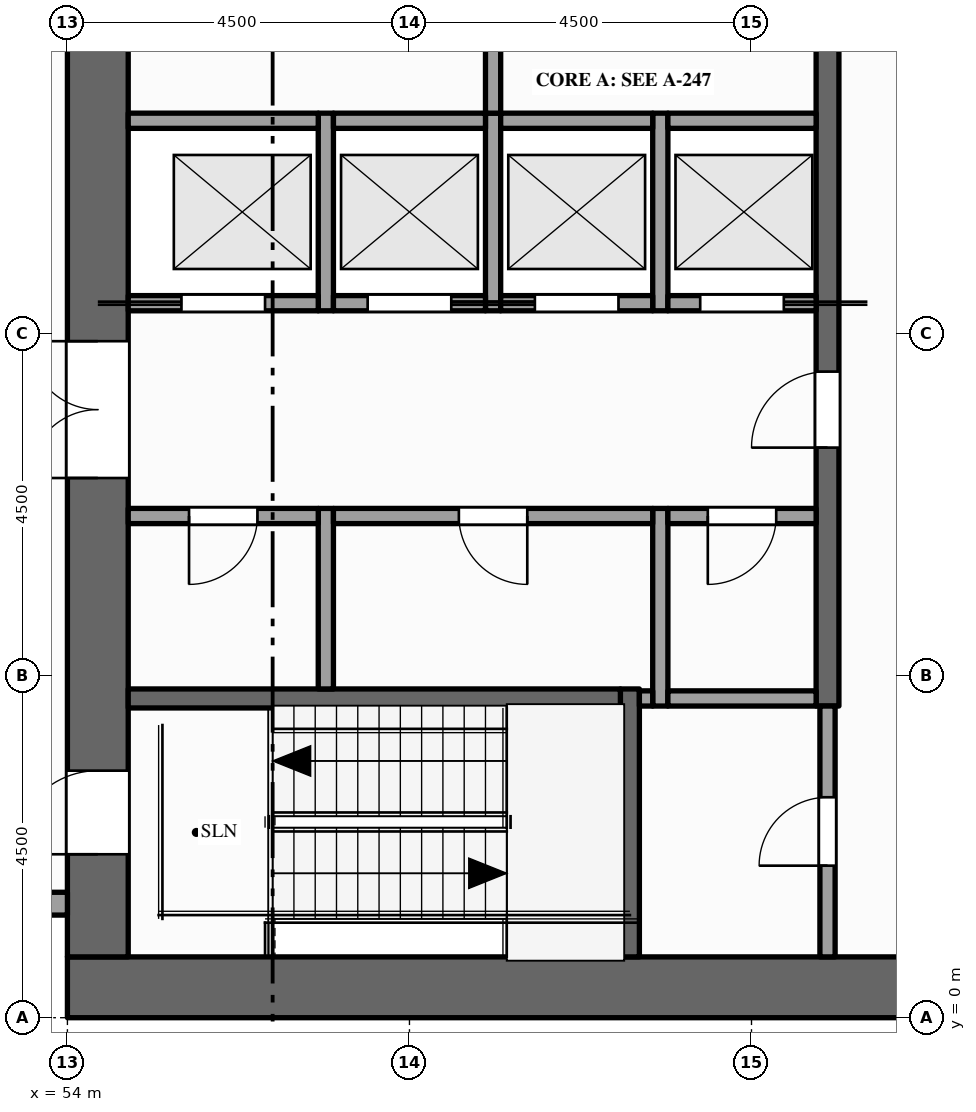
"""IFC4 building model, lengths in metres.
Left out: names, types, materials, properties, quantities, classifications, styles, units other than length and angle.
Written with IfcOpenShell. Run it as: python <this file> out.ifc"""

import sys

from ifc_helpers import new_model, si_unit, direction, frame, frame_2d, origin, place, context, subcontext, project, spatial, rectangle, extrude, element, fill, save


model = new_model("IFC4")
c1 = context("Model", 3, precision=1e-05, world=origin(), true_north=direction((0.0, 1.0)))
c2 = subcontext(c1, "Body", "Model", "MODEL_VIEW")
j1 = project(units=[si_unit("LENGTHUNIT", "METRE"), si_unit("PLANEANGLEUNIT", "RADIAN")], contexts=[c1])
p1 = place(None, origin())
s1 = spatial("IfcSite", under=j1, at=p1, CompositionType="ELEMENT")
p2 = place(p1, origin())
s2 = spatial("IfcBuilding", under=s1, at=p2, CompositionType="ELEMENT")
p3 = place(p2, frame((0.0, 0.0, 269.0)))
s3 = spatial("IfcBuildingStorey", under=s2, at=p3, CompositionType="ELEMENT", Elevation=269.0)
p4 = place(p3, frame((67.5, 0.4, -0.15), z_axis=(0.0, 0.0, 1.0), x_axis=(-1.0, 0.0, 0.0)))
e1 = element("IfcWall", 1, at=p4, inside=s3, PredefinedType="SHEAR", context=c2, shape_type="SweptSolid", body=[
    extrude(rectangle(XDim=13.5, YDim=0.8, at=frame_2d((6.75, 0.0))), origin(), (0.0, 0.0, 1.0), 4.0),
])
p5 = place(p3, frame((54.4, 0.8, -0.15), z_axis=(0.0, 0.0, 1.0), x_axis=(0.0, 1.0, 0.0)))
e2 = element("IfcWall", 2, at=p5, inside=s3, PredefinedType="SHEAR", context=c2, shape_type="SweptSolid", body=[
    extrude(rectangle(XDim=20.9, YDim=0.8, at=frame_2d((10.45, 0.0))), origin(), (0.0, 0.0, 1.0), 4.0),
])
p6 = place(p5, frame((6.3, 0.0, 0.15)))
e3 = element("IfcOpeningElement", 3, at=p6, cuts=e2, PredefinedType="OPENING", context=c2, shape_type="SweptSolid", body=[
    extrude(rectangle(XDim=1.8, YDim=2.1, at=frame_2d((0.9, 1.05))), frame((0.0, 0.41, 0.0), z_axis=(0.0, -1.0, 0.0), x_axis=(1.0, 0.0, 0.0)), (0.0, 0.0, 1.0), 0.82),
])
p7 = place(p5, frame((12.35, 0.0, 0.15)))
e4 = element("IfcOpeningElement", 4, at=p7, cuts=e2, PredefinedType="OPENING", context=c2, shape_type="SweptSolid", body=[
    extrude(rectangle(XDim=1.1, YDim=2.1, at=frame_2d((0.55, 1.05))), frame((0.0, 0.41, 0.0), z_axis=(0.0, -1.0, 0.0), x_axis=(1.0, 0.0, 0.0)), (0.0, 0.0, 1.0), 0.82),
])
p8 = place(p5, frame((1.35, 0.0, 0.15)))
e5 = element("IfcOpeningElement", 5, at=p8, cuts=e2, PredefinedType="OPENING", context=c2, shape_type="SweptSolid", body=[
    extrude(rectangle(XDim=1.1, YDim=2.1, at=frame_2d((0.55, 1.05))), frame((0.0, 0.41, 0.0), z_axis=(0.0, -1.0, 0.0), x_axis=(1.0, 0.0, 0.0)), (0.0, 0.0, 1.0), 0.82),
])
p9 = place(p5, frame((18.55, 0.0, 0.15)))
e6 = element("IfcOpeningElement", 6, at=p9, cuts=e2, PredefinedType="OPENING", context=c2, shape_type="SweptSolid", body=[
    extrude(rectangle(XDim=1.1, YDim=2.1, at=frame_2d((0.55, 1.05))), frame((0.0, 0.41, 0.0), z_axis=(0.0, -1.0, 0.0), x_axis=(1.0, 0.0, 0.0)), (0.0, 0.0, 1.0), 0.82),
])
p10 = place(p3, frame((49.825, 1.5, 0.0), z_axis=(0.0, 0.0, 1.0), x_axis=(1.0, 0.0, 0.0)))
e7 = element("IfcWall", 7, at=p10, inside=s3, PredefinedType="STANDARD", context=c2, shape_type="SweptSolid", body=[
    extrude(rectangle(XDim=4.175, YDim=0.3, at=frame_2d((2.087, 0.0))), origin(), (0.0, 0.0, 1.0), 2.87),
])
p11 = place(p10, frame((0.413, 0.0, 0.9)))
e8 = element("IfcOpeningElement", 8, at=p11, cuts=e7, PredefinedType="OPENING", context=c2, shape_type="SweptSolid", body=[
    extrude(rectangle(XDim=1.2, YDim=1.75, at=frame_2d((0.6, 0.875))), frame((0.0, 0.16, 0.0), z_axis=(0.0, -1.0, 0.0), x_axis=(1.0, 0.0, 0.0)), (0.0, 0.0, 1.0), 0.32),
])
p12 = place(p10, frame((2.225, 0.0, 0.9)))
e9 = element("IfcOpeningElement", 9, at=p12, cuts=e7, PredefinedType="OPENING", context=c2, shape_type="SweptSolid", body=[
    extrude(rectangle(XDim=1.55, YDim=1.75, at=frame_2d((0.775, 0.875))), frame((0.0, 0.16, 0.0), z_axis=(0.0, -1.0, 0.0), x_axis=(1.0, 0.0, 0.0)), (0.0, 0.0, 1.0), 0.32),
])
p13 = place(p3, frame((57.4, 4.325, 0.0), z_axis=(0.0, 0.0, 1.0), x_axis=(0.0, 1.0, 0.0)))
e10 = element("IfcWall", 10, at=p13, inside=s3, PredefinedType="PARTITIONING", context=c2, shape_type="SweptSolid", body=[
    extrude(rectangle(XDim=2.375, YDim=0.2, at=frame_2d((1.188, 0.0))), origin(), (0.0, 0.0, 1.0), 3.85),
])
for number, where, z_axis, x_axis in (
    (11, (57.4, 9.3, 0.0), (0.0, 0.0, 1.0), (0.0, 1.0, 0.0)),
    (12, (59.6, 9.3, 0.0), (0.0, 0.0, 1.0), (0.0, 1.0, 0.0)),
):
    element("IfcWall", number, at=place(p3, frame(where, z_axis=z_axis, x_axis=x_axis)), inside=s3, PredefinedType="SOLIDWALL", context=c2, shape_type="SweptSolid", body=[
        extrude(rectangle(XDim=2.6, YDim=0.2, at=frame_2d((1.3, 0.0))), origin(), (0.0, 0.0, 1.0), 3.85),
    ])
p14 = place(p3, frame((59.6, 11.9, 0.0), z_axis=(0.0, 0.0, 1.0), x_axis=(0.0, 1.0, 0.0)))
e13 = element("IfcWall", 13, at=p14, inside=s3, PredefinedType="PARTITIONING", context=c2, shape_type="SweptSolid", body=[
    extrude(rectangle(XDim=3.6, YDim=0.2, at=frame_2d((1.8, 0.0))), origin(), (0.0, 0.0, 1.0), 3.85),
])
p15 = place(p14, frame((1.3, 0.0, 0.0)))
e14 = element("IfcOpeningElement", 14, at=p15, cuts=e13, PredefinedType="OPENING", context=c2, shape_type="SweptSolid", body=[
    extrude(rectangle(XDim=1.0, YDim=2.1, at=frame_2d((0.5, 1.05))), frame((0.0, 0.11, 0.0), z_axis=(0.0, -1.0, 0.0), x_axis=(1.0, 0.0, 0.0)), (0.0, 0.0, 1.0), 0.22),
])
p16 = place(p3, frame((61.4, 0.8, 0.0), z_axis=(0.0, 0.0, 1.0), x_axis=(0.0, 1.0, 0.0)))
e15 = element("IfcWall", 15, at=p16, inside=s3, PredefinedType="SHEAR", context=c2, shape_type="SweptSolid", body=[
    extrude(rectangle(XDim=3.525, YDim=0.25, at=frame_2d((1.762, 0.0))), origin(), (0.0, 0.0, 1.0), 3.85),
])
p17 = place(p3, frame((61.8, 4.1, 0.0), z_axis=(0.0, 0.0, 1.0), x_axis=(0.0, 1.0, 0.0)))
e16 = element("IfcWall", 16, at=p17, inside=s3, PredefinedType="PARTITIONING", context=c2, shape_type="SweptSolid", body=[
    extrude(rectangle(XDim=2.6, YDim=0.2, at=frame_2d((1.3, 0.0))), origin(), (0.0, 0.0, 1.0), 3.85),
])
p18 = place(p3, frame((61.8, 9.3, 0.0), z_axis=(0.0, 0.0, 1.0), x_axis=(0.0, 1.0, 0.0)))
e17 = element("IfcWall", 17, at=p18, inside=s3, PredefinedType="SOLIDWALL", context=c2, shape_type="SweptSolid", body=[
    extrude(rectangle(XDim=2.6, YDim=0.2, at=frame_2d((1.3, 0.0))), origin(), (0.0, 0.0, 1.0), 3.85),
])
p19 = place(p3, frame((64.0, 0.8, 0.0), z_axis=(0.0, 0.0, 1.0), x_axis=(0.0, 1.0, 0.0)))
e18 = element("IfcWall", 18, at=p19, inside=s3, PredefinedType="PARTITIONING", context=c2, shape_type="SweptSolid", body=[
    extrude(rectangle(XDim=3.3, YDim=0.2, at=frame_2d((1.65, 0.0))), origin(), (0.0, 0.0, 1.0), 3.85),
])
p20 = place(p19, frame((1.2, 0.0, 0.0)))
e19 = element("IfcOpeningElement", 19, at=p20, cuts=e18, PredefinedType="OPENING", context=c2, shape_type="SweptSolid", body=[
    extrude(rectangle(XDim=0.9, YDim=2.1, at=frame_2d((0.45, 1.05))), frame((0.0, 0.11, 0.0), z_axis=(0.0, -1.0, 0.0), x_axis=(1.0, 0.0, 0.0)), (0.0, 0.0, 1.0), 0.22),
])
p21 = place(p3, frame((64.0, 4.1, 0.0), z_axis=(0.0, 0.0, 1.0), x_axis=(0.0, 1.0, 0.0)))
e20 = element("IfcWall", 20, at=p21, inside=s3, PredefinedType="SHEAR", context=c2, shape_type="SweptSolid", body=[
    extrude(rectangle(XDim=14.5, YDim=0.3, at=frame_2d((7.25, 0.0))), origin(), (0.0, 0.0, 1.0), 3.85),
])
p22 = place(p21, frame((3.4, 0.0, 0.0)))
e21 = element("IfcOpeningElement", 21, at=p22, cuts=e20, PredefinedType="OPENING", context=c2, shape_type="SweptSolid", body=[
    extrude(rectangle(XDim=1.0, YDim=2.1, at=frame_2d((0.5, 1.05))), frame((0.0, 0.16, 0.0), z_axis=(0.0, -1.0, 0.0), x_axis=(1.0, 0.0, 0.0)), (0.0, 0.0, 1.0), 0.32),
])
p23 = place(p21, frame((9.1, 0.0, 0.0)))
e22 = element("IfcOpeningElement", 22, at=p23, cuts=e20, PredefinedType="OPENING", context=c2, shape_type="SweptSolid", body=[
    extrude(rectangle(XDim=1.0, YDim=2.1, at=frame_2d((0.5, 1.05))), frame((0.0, 0.16, 0.0), z_axis=(0.0, -1.0, 0.0), x_axis=(1.0, 0.0, 0.0)), (0.0, 0.0, 1.0), 0.32),
])
p24 = place(p3, frame((54.8, 4.2, 0.0), z_axis=(0.0, 0.0, 1.0), x_axis=(1.0, 0.0, 0.0)))
e23 = element("IfcWall", 23, at=p24, inside=s3, PredefinedType="SHEAR", context=c2, shape_type="SweptSolid", body=[
    extrude(rectangle(XDim=6.475, YDim=0.25, at=frame_2d((3.237, 0.0))), origin(), (0.0, 0.0, 1.0), 3.85),
])
p25 = place(p3, frame((61.525, 4.2, 0.0), z_axis=(0.0, 0.0, 1.0), x_axis=(1.0, 0.0, 0.0)))
e24 = element("IfcWall", 24, at=p25, inside=s3, PredefinedType="PARTITIONING", context=c2, shape_type="SweptSolid", body=[
    extrude(rectangle(XDim=0.175, YDim=0.2, at=frame_2d((0.087, 0.0))), origin(), (0.0, 0.0, 1.0), 3.85),
])
p26 = place(p3, frame((61.9, 4.2, 0.0), z_axis=(0.0, 0.0, 1.0), x_axis=(1.0, 0.0, 0.0)))
e25 = element("IfcWall", 25, at=p26, inside=s3, PredefinedType="PARTITIONING", context=c2, shape_type="SweptSolid", body=[
    extrude(rectangle(XDim=1.95, YDim=0.2, at=frame_2d((0.975, 0.0))), origin(), (0.0, 0.0, 1.0), 3.85),
])
p27 = place(p3, frame((54.8, 6.6, 0.0), z_axis=(0.0, 0.0, 1.0), x_axis=(1.0, 0.0, 0.0)))
e26 = element("IfcWall", 26, at=p27, inside=s3, PredefinedType="PARTITIONING", context=c2, shape_type="SweptSolid", body=[
    extrude(rectangle(XDim=2.5, YDim=0.2, at=frame_2d((1.25, 0.0))), origin(), (0.0, 0.0, 1.0), 3.85),
])
p28 = place(p27, frame((0.8, 0.0, 0.0)))
e27 = element("IfcOpeningElement", 27, at=p28, cuts=e26, PredefinedType="OPENING", context=c2, shape_type="SweptSolid", body=[
    extrude(rectangle(XDim=0.9, YDim=2.1, at=frame_2d((0.45, 1.05))), frame((0.0, 0.11, 0.0), z_axis=(0.0, -1.0, 0.0), x_axis=(1.0, 0.0, 0.0)), (0.0, 0.0, 1.0), 0.22),
])
p29 = place(p3, frame((57.5, 6.6, 0.0), z_axis=(0.0, 0.0, 1.0), x_axis=(1.0, 0.0, 0.0)))
e28 = element("IfcWall", 28, at=p29, inside=s3, PredefinedType="PARTITIONING", context=c2, shape_type="SweptSolid", body=[
    extrude(rectangle(XDim=4.2, YDim=0.2, at=frame_2d((2.1, 0.0))), origin(), (0.0, 0.0, 1.0), 3.85),
])
p30 = place(p29, frame((1.65, 0.0, 0.0)))
e29 = element("IfcOpeningElement", 29, at=p30, cuts=e28, PredefinedType="OPENING", context=c2, shape_type="SweptSolid", body=[
    extrude(rectangle(XDim=0.9, YDim=2.1, at=frame_2d((0.45, 1.05))), frame((0.0, 0.11, 0.0), z_axis=(0.0, -1.0, 0.0), x_axis=(1.0, 0.0, 0.0)), (0.0, 0.0, 1.0), 0.22),
])
p31 = place(p3, frame((61.9, 6.6, 0.0), z_axis=(0.0, 0.0, 1.0), x_axis=(1.0, 0.0, 0.0)))
e30 = element("IfcWall", 30, at=p31, inside=s3, PredefinedType="PARTITIONING", context=c2, shape_type="SweptSolid", body=[
    extrude(rectangle(XDim=1.95, YDim=0.2, at=frame_2d((0.975, 0.0))), origin(), (0.0, 0.0, 1.0), 3.85),
])
p32 = place(p31, frame((0.525, 0.0, 0.0)))
e31 = element("IfcOpeningElement", 31, at=p32, cuts=e30, PredefinedType="OPENING", context=c2, shape_type="SweptSolid", body=[
    extrude(rectangle(XDim=0.9, YDim=2.1, at=frame_2d((0.45, 1.05))), frame((0.0, 0.11, 0.0), z_axis=(0.0, -1.0, 0.0), x_axis=(1.0, 0.0, 0.0)), (0.0, 0.0, 1.0), 0.22),
])
p33 = place(p3, frame((54.8, 9.4, 0.0), z_axis=(0.0, 0.0, 1.0), x_axis=(1.0, 0.0, 0.0)))
e32 = element("IfcWall", 32, at=p33, inside=s3, PredefinedType="SOLIDWALL", context=c2, shape_type="SweptSolid", body=[
    extrude(rectangle(XDim=2.5, YDim=0.2, at=frame_2d((1.25, 0.0))), origin(), (0.0, 0.0, 1.0), 3.85),
])
p34 = place(p33, frame((0.7, 0.0, 0.012)))
e33 = element("IfcOpeningElement", 33, at=p34, cuts=e32, PredefinedType="OPENING", context=c2, shape_type="SweptSolid", body=[
    extrude(rectangle(XDim=1.1, YDim=2.1, at=frame_2d((0.55, 1.05))), frame((0.0, 0.11, 0.0), z_axis=(0.0, -1.0, 0.0), x_axis=(1.0, 0.0, 0.0)), (0.0, 0.0, 1.0), 0.22),
])
p35 = place(p3, frame((57.5, 9.4, 0.0), z_axis=(0.0, 0.0, 1.0), x_axis=(1.0, 0.0, 0.0)))
e34 = element("IfcWall", 34, at=p35, inside=s3, PredefinedType="SOLIDWALL", context=c2, shape_type="SweptSolid", body=[
    extrude(rectangle(XDim=2.0, YDim=0.2, at=frame_2d((1.0, 0.0))), origin(), (0.0, 0.0, 1.0), 3.85),
])
p36 = place(p35, frame((0.45, 0.0, 0.012)))
e35 = element("IfcOpeningElement", 35, at=p36, cuts=e34, PredefinedType="OPENING", context=c2, shape_type="SweptSolid", body=[
    extrude(rectangle(XDim=1.1, YDim=2.1, at=frame_2d((0.55, 1.05))), frame((0.0, 0.11, 0.0), z_axis=(0.0, -1.0, 0.0), x_axis=(1.0, 0.0, 0.0)), (0.0, 0.0, 1.0), 0.22),
])
p37 = place(p3, frame((59.7, 9.4, 0.0), z_axis=(0.0, 0.0, 1.0), x_axis=(1.0, 0.0, 0.0)))
e36 = element("IfcWall", 36, at=p37, inside=s3, PredefinedType="SOLIDWALL", context=c2, shape_type="SweptSolid", body=[
    extrude(rectangle(XDim=2.0, YDim=0.2, at=frame_2d((1.0, 0.0))), origin(), (0.0, 0.0, 1.0), 3.85),
])
p38 = place(p37, frame((0.45, 0.0, 0.012)))
e37 = element("IfcOpeningElement", 37, at=p38, cuts=e36, PredefinedType="OPENING", context=c2, shape_type="SweptSolid", body=[
    extrude(rectangle(XDim=1.1, YDim=2.1, at=frame_2d((0.55, 1.05))), frame((0.0, 0.11, 0.0), z_axis=(0.0, -1.0, 0.0), x_axis=(1.0, 0.0, 0.0)), (0.0, 0.0, 1.0), 0.22),
])
p39 = place(p3, frame((61.9, 9.4, 0.0), z_axis=(0.0, 0.0, 1.0), x_axis=(1.0, 0.0, 0.0)))
e38 = element("IfcWall", 38, at=p39, inside=s3, PredefinedType="SOLIDWALL", context=c2, shape_type="SweptSolid", body=[
    extrude(rectangle(XDim=1.95, YDim=0.2, at=frame_2d((0.975, 0.0))), origin(), (0.0, 0.0, 1.0), 3.85),
])
p40 = place(p39, frame((0.425, 0.0, 0.012)))
e39 = element("IfcOpeningElement", 39, at=p40, cuts=e38, PredefinedType="OPENING", context=c2, shape_type="SweptSolid", body=[
    extrude(rectangle(XDim=1.1, YDim=2.1, at=frame_2d((0.55, 1.05))), frame((0.0, 0.11, 0.0), z_axis=(0.0, -1.0, 0.0), x_axis=(1.0, 0.0, 0.0)), (0.0, 0.0, 1.0), 0.22),
])
p41 = place(p3, frame((54.8, 11.8, 0.0), z_axis=(0.0, 0.0, 1.0), x_axis=(1.0, 0.0, 0.0)))
e40 = element("IfcWall", 40, at=p41, inside=s3, PredefinedType="SOLIDWALL", context=c2, shape_type="SweptSolid", body=[
    extrude(rectangle(XDim=2.5, YDim=0.2, at=frame_2d((1.25, 0.0))), origin(), (0.0, 0.0, 1.0), 3.85),
])
for number, where, z_axis, x_axis in (
    (41, (57.5, 11.8, 0.0), (0.0, 0.0, 1.0), (1.0, 0.0, 0.0)),
    (42, (59.7, 11.8, 0.0), (0.0, 0.0, 1.0), (1.0, 0.0, 0.0)),
):
    element("IfcWall", number, at=place(p3, frame(where, z_axis=z_axis, x_axis=x_axis)), inside=s3, PredefinedType="SOLIDWALL", context=c2, shape_type="SweptSolid", body=[
        extrude(rectangle(XDim=2.0, YDim=0.2, at=frame_2d((1.0, 0.0))), origin(), (0.0, 0.0, 1.0), 3.85),
    ])
p42 = place(p3, frame((61.9, 11.8, 0.0), z_axis=(0.0, 0.0, 1.0), x_axis=(1.0, 0.0, 0.0)))
e43 = element("IfcWall", 43, at=p42, inside=s3, PredefinedType="SOLIDWALL", context=c2, shape_type="SweptSolid", body=[
    extrude(rectangle(XDim=1.95, YDim=0.2, at=frame_2d((0.975, 0.0))), origin(), (0.0, 0.0, 1.0), 3.85),
])
p43 = place(p34, origin())
e44 = element("IfcDoor", 44, at=p43, inside=s3, OperationType="SLIDING_TO_LEFT", PredefinedType="DOOR", context=c2, shape_type="SweptSolid", body=[
    extrude(rectangle(XDim=1.1, YDim=2.1, at=frame_2d((0.55, 1.05))), frame((0.0, 0.025, 0.0), z_axis=(0.0, -1.0, 0.0), x_axis=(1.0, 0.0, 0.0)), (0.0, 0.0, 1.0), 0.05),
])
fill(e33, e44)
p44 = place(p36, origin())
e45 = element("IfcDoor", 45, at=p44, inside=s3, OperationType="SLIDING_TO_RIGHT", PredefinedType="DOOR", context=c2, shape_type="SweptSolid", body=[
    extrude(rectangle(XDim=1.1, YDim=2.1, at=frame_2d((0.55, 1.05))), frame((0.0, 0.025, 0.0), z_axis=(0.0, -1.0, 0.0), x_axis=(1.0, 0.0, 0.0)), (0.0, 0.0, 1.0), 0.05),
])
fill(e35, e45)
p45 = place(p38, origin())
e46 = element("IfcDoor", 46, at=p45, inside=s3, OperationType="SLIDING_TO_LEFT", PredefinedType="DOOR", context=c2, shape_type="SweptSolid", body=[
    extrude(rectangle(XDim=1.1, YDim=2.1, at=frame_2d((0.55, 1.05))), frame((0.0, 0.025, 0.0), z_axis=(0.0, -1.0, 0.0), x_axis=(1.0, 0.0, 0.0)), (0.0, 0.0, 1.0), 0.05),
])
fill(e37, e46)
p46 = place(p40, origin())
e47 = element("IfcDoor", 47, at=p46, inside=s3, OperationType="SLIDING_TO_RIGHT", PredefinedType="DOOR", context=c2, shape_type="SweptSolid", body=[
    extrude(rectangle(XDim=1.1, YDim=2.1, at=frame_2d((0.55, 1.05))), frame((0.0, 0.025, 0.0), z_axis=(0.0, -1.0, 0.0), x_axis=(1.0, 0.0, 0.0)), (0.0, 0.0, 1.0), 0.05),
])
fill(e39, e47)
p47 = place(p6, origin())
e48 = element("IfcDoor", 48, at=p47, inside=s3, OperationType="DOUBLE_DOOR_SINGLE_SWING", PredefinedType="DOOR", context=c2, shape_type="SweptSolid", body=[
    extrude(rectangle(XDim=1.8, YDim=2.1, at=frame_2d((0.9, 1.05))), frame((0.0, 0.025, 0.0), z_axis=(0.0, -1.0, 0.0), x_axis=(1.0, 0.0, 0.0)), (0.0, 0.0, 1.0), 0.05),
])
fill(e3, e48)
p48 = place(p22, origin())
e49 = element("IfcDoor", 49, at=p48, inside=s3, OperationType="SINGLE_SWING_LEFT", PredefinedType="DOOR", context=c2, shape_type="SweptSolid", body=[
    extrude(rectangle(XDim=1.0, YDim=2.1, at=frame_2d((0.5, 1.05))), frame((0.0, 0.025, 0.0), z_axis=(0.0, -1.0, 0.0), x_axis=(1.0, 0.0, 0.0)), (0.0, 0.0, 1.0), 0.05),
])
fill(e21, e49)
p49 = place(p8, origin())
e50 = element("IfcDoor", 50, at=p49, inside=s3, OperationType="SINGLE_SWING_LEFT", PredefinedType="DOOR", context=c2, shape_type="SweptSolid", body=[
    extrude(rectangle(XDim=1.1, YDim=2.1, at=frame_2d((0.55, 1.05))), frame((0.0, 0.025, 0.0), z_axis=(0.0, -1.0, 0.0), x_axis=(1.0, 0.0, 0.0)), (0.0, 0.0, 1.0), 0.05),
])
fill(e5, e50)
p50 = place(p20, origin())
e51 = element("IfcDoor", 51, at=p50, inside=s3, OperationType="SINGLE_SWING_LEFT", PredefinedType="DOOR", context=c2, shape_type="SweptSolid", body=[
    extrude(rectangle(XDim=0.9, YDim=2.1, at=frame_2d((0.45, 1.05))), frame((0.0, 0.025, 0.0), z_axis=(0.0, -1.0, 0.0), x_axis=(1.0, 0.0, 0.0)), (0.0, 0.0, 1.0), 0.05),
])
fill(e19, e51)
p51 = place(p28, origin())
e52 = element("IfcDoor", 52, at=p51, inside=s3, OperationType="SINGLE_SWING_LEFT", PredefinedType="DOOR", context=c2, shape_type="SweptSolid", body=[
    extrude(rectangle(XDim=0.9, YDim=2.1, at=frame_2d((0.45, 1.05))), frame((0.0, 0.025, 0.0), z_axis=(0.0, -1.0, 0.0), x_axis=(1.0, 0.0, 0.0)), (0.0, 0.0, 1.0), 0.05),
])
fill(e27, e52)
p52 = place(p30, origin())
e53 = element("IfcDoor", 53, at=p52, inside=s3, OperationType="SINGLE_SWING_RIGHT", PredefinedType="DOOR", context=c2, shape_type="SweptSolid", body=[
    extrude(rectangle(XDim=0.9, YDim=2.1, at=frame_2d((0.45, 1.05))), frame((0.0, 0.025, 0.0), z_axis=(0.0, -1.0, 0.0), x_axis=(1.0, 0.0, 0.0)), (0.0, 0.0, 1.0), 0.05),
])
fill(e29, e53)
p53 = place(p32, origin())
e54 = element("IfcDoor", 54, at=p53, inside=s3, OperationType="SINGLE_SWING_LEFT", PredefinedType="DOOR", context=c2, shape_type="SweptSolid", body=[
    extrude(rectangle(XDim=0.9, YDim=2.1, at=frame_2d((0.45, 1.05))), frame((0.0, 0.025, 0.0), z_axis=(0.0, -1.0, 0.0), x_axis=(1.0, 0.0, 0.0)), (0.0, 0.0, 1.0), 0.05),
])
fill(e31, e54)
save(model, sys.argv[1])
